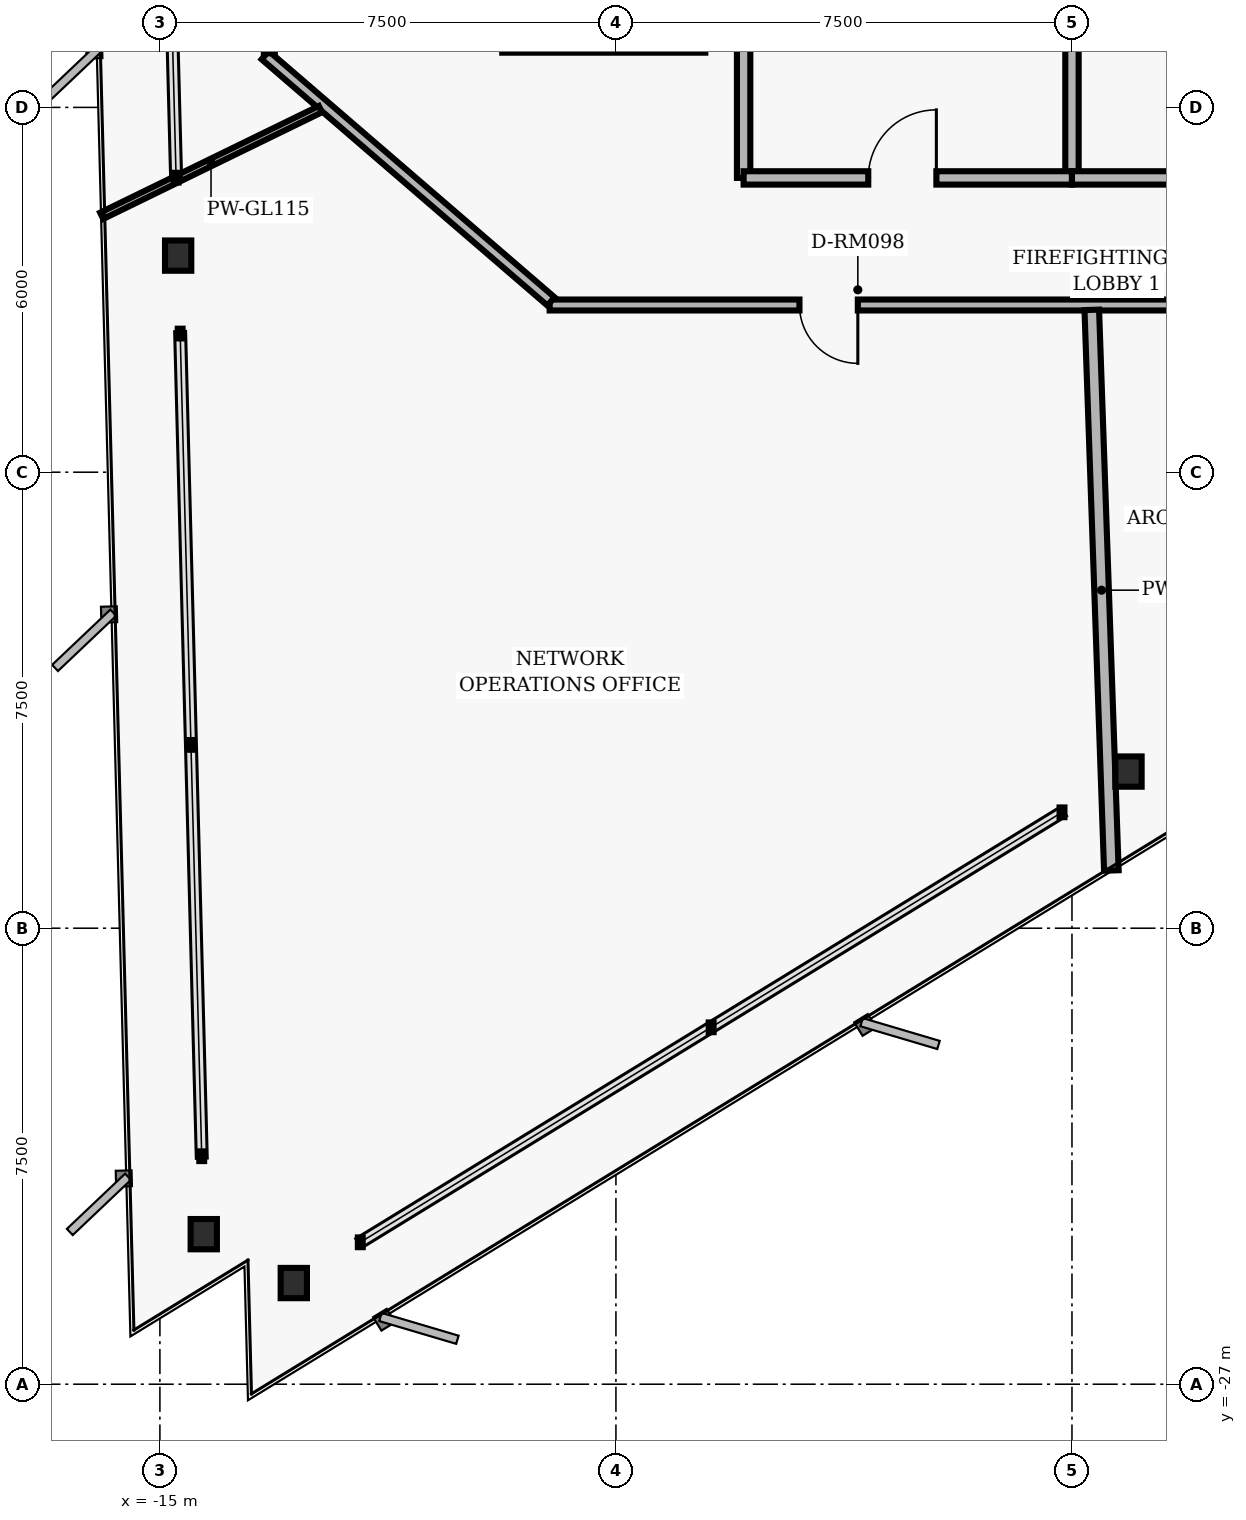
"""IFC4 building model, lengths in metres.
Left out: names, types, materials, properties, quantities, classifications, styles, units other than length and angle.
Written with IfcOpenShell. Run it as: python <this file> out.ifc"""

import sys

from ifc_helpers import new_model, si_unit, direction, frame, frame_2d, origin, origin_2d, place, context, subcontext, project, spatial, rectangle, i_section, extrude, element, fill, save


model = new_model("IFC4")
c1 = context("Model", 3, precision=1e-05, world=origin(), true_north=direction((0.0, 1.0)))
c2 = subcontext(c1, "Body", "Model", "MODEL_VIEW")
j1 = project(units=[si_unit("LENGTHUNIT", "METRE"), si_unit("PLANEANGLEUNIT", "RADIAN")], contexts=[c1])
p1 = place(None, origin())
s1 = spatial("IfcSite", under=j1, at=p1, CompositionType="ELEMENT")
p2 = place(p1, origin())
s2 = spatial("IfcBuilding", under=s1, at=p2, CompositionType="ELEMENT")
p3 = place(p2, frame((0.0, 0.0, 22.24)))
s3 = spatial("IfcBuildingStorey", under=s2, at=p3, CompositionType="ELEMENT", Elevation=22.24)
for number, where, z_axis, x_axis in (
    (1, (-14.7, -8.438, 0.0), (0.0, 0.0, 1.0), (1.0, 0.0, 0.0)),
    (2, (-14.279, -24.532, 0.0), (0.0, 0.0, 1.0), (1.0, 0.0, 0.0)),
    (3, (-12.798, -25.336, 0.0), (0.0, 0.0, 1.0), (1.0, 0.0, 0.0)),
    (4, (0.93, -16.924, 0.0), (0.0, 0.0, 1.0), (1.0, 0.0, 0.0)),
):
    element("IfcColumn", number, at=place(p3, frame(where, z_axis=z_axis, x_axis=x_axis)), inside=s3, PredefinedType="COLUMN", context=c2, shape_type="SweptSolid", body=[
        extrude(i_section(OverallWidth=0.432, OverallDepth=0.498, WebThickness=0.056, FlangeThickness=0.089, FilletRadius=0.025, at=origin_2d()), origin(), (0.0, 0.0, 1.0), 3.36),
    ])
p4 = place(p3, frame((-5.4, -7.16, 0.0), z_axis=(0.0, 0.0, 1.0), x_axis=(0.0, 1.0, 0.0)))
e5 = element("IfcWall", 5, at=p4, inside=s3, PredefinedType="PARTITIONING", context=c2, shape_type="SweptSolid", body=[
    extrude(rectangle(XDim=2.71, YDim=0.22, at=frame_2d((1.355, 0.0))), origin(), (0.0, 0.0, 1.0), 3.073),
])
p5 = place(p3, frame((0.0, -7.16, 0.0), z_axis=(0.0, 0.0, 1.0), x_axis=(0.0, 1.0, 0.0)))
e6 = element("IfcWall", 6, at=p5, inside=s3, PredefinedType="PARTITIONING", context=c2, shape_type="SweptSolid", body=[
    extrude(rectangle(XDim=2.81, YDim=0.22, at=frame_2d((1.405, 0.0))), origin(), (0.0, 0.0, 1.0), 3.073),
])
p6 = place(p3, frame((-5.4, -7.16, 0.0), z_axis=(0.0, 0.0, 1.0), x_axis=(1.0, 0.0, 0.0)))
e7 = element("IfcWall", 7, at=p6, inside=s3, PredefinedType="PARTITIONING", context=c2, shape_type="SweptSolid", body=[
    extrude(rectangle(XDim=5.4, YDim=0.22, at=frame_2d((2.7, 0.0))), origin(), (0.0, 0.0, 1.0), 3.073),
])
p7 = place(p6, frame((2.05, 0.0, 0.0)))
e8 = element("IfcOpeningElement", 8, at=p7, cuts=e7, PredefinedType="OPENING", context=c2, shape_type="SweptSolid", body=[
    extrude(rectangle(XDim=1.12, YDim=2.02, at=frame_2d((0.56, 1.01))), frame((0.0, 0.12, 0.0), z_axis=(0.0, -1.0, 0.0), x_axis=(1.0, 0.0, 0.0)), (0.0, 0.0, 1.0), 0.24),
])
p8 = place(p3, frame((0.0, -7.16, 0.0), z_axis=(0.0, 0.0, 1.0), x_axis=(1.0, 0.0, 0.0)))
e9 = element("IfcWall", 9, at=p8, inside=s3, PredefinedType="PARTITIONING", context=c2, shape_type="SweptSolid", body=[
    extrude(rectangle(XDim=5.4, YDim=0.22, at=frame_2d((2.7, 0.0))), origin(), (0.0, 0.0, 1.0), 3.073),
])
p9 = place(p8, frame((2.05, 0.0, 0.0)))
e10 = element("IfcOpeningElement", 10, at=p9, cuts=e9, PredefinedType="OPENING", context=c2, shape_type="SweptSolid", body=[
    extrude(rectangle(XDim=1.12, YDim=2.02, at=frame_2d((0.56, 1.01))), frame((0.0, 0.12, 0.0), z_axis=(0.0, -1.0, 0.0), x_axis=(1.0, 0.0, 0.0)), (0.0, 0.0, 1.0), 0.24),
])
p10 = place(p3, frame((8.41, -9.25, 0.0), z_axis=(0.0, 0.0, 1.0), x_axis=(-1.0, 0.0, 0.0)))
e11 = element("IfcWall", 11, at=p10, inside=s3, PredefinedType="PARTITIONING", context=c2, shape_type="SweptSolid", body=[
    extrude(rectangle(XDim=17.0, YDim=0.18, at=frame_2d((8.5, 0.0))), origin(), (0.0, 0.0, 1.0), 2.587),
])
p11 = place(p10, frame((11.932, 0.0, 0.0)))
e12 = element("IfcOpeningElement", 12, at=p11, cuts=e11, PredefinedType="OPENING", context=c2, shape_type="SweptSolid", body=[
    extrude(rectangle(XDim=0.96, YDim=2.02, at=frame_2d((0.48, 1.01))), frame((0.0, 0.1, 0.0), z_axis=(0.0, -1.0, 0.0), x_axis=(1.0, 0.0, 0.0)), (0.0, 0.0, 1.0), 0.2),
])
p12 = place(p10, frame((3.692, 0.0, 0.0)))
e13 = element("IfcOpeningElement", 13, at=p12, cuts=e11, PredefinedType="OPENING", context=c2, shape_type="SweptSolid", body=[
    extrude(rectangle(XDim=0.96, YDim=2.02, at=frame_2d((0.48, 1.01))), frame((0.0, 0.1, 0.0), z_axis=(0.0, -1.0, 0.0), x_axis=(1.0, 0.0, 0.0)), (0.0, 0.0, 1.0), 0.2),
])
p13 = place(p3, frame((-8.568, -9.191, 0.0), z_axis=(0.0, 0.0, 1.0), x_axis=(-0.757556899173, 0.652769135694, 0.0)))
e14 = element("IfcWall", 14, at=p13, inside=s3, PredefinedType="PARTITIONING", context=c2, shape_type="SweptSolid", body=[
    extrude(rectangle(XDim=6.204, YDim=0.18, at=frame_2d((3.102, 0.0))), origin(), (0.0, 0.0, 1.0), 3.073),
])
p14 = place(p3, frame((-13.2, -5.11, 0.0), z_axis=(0.0, 0.0, 1.0), x_axis=(0.0, 1.0, 0.0)))
e15 = element("IfcWall", 15, at=p14, inside=s3, PredefinedType="PARTITIONING", context=c2, shape_type="SweptSolid", body=[
    extrude(rectangle(XDim=10.22, YDim=0.18, at=frame_2d((5.11, 0.0))), origin(), (0.0, 0.0, 1.0), 2.587),
])
p15 = place(p14, frame((4.361, 0.0, 0.0)))
e16 = element("IfcOpeningElement", 16, at=p15, cuts=e15, PredefinedType="OPENING", context=c2, shape_type="SweptSolid", body=[
    extrude(rectangle(XDim=0.96, YDim=2.02, at=frame_2d((0.48, 1.01))), frame((0.0, 0.1, 0.0), z_axis=(0.0, -1.0, 0.0), x_axis=(1.0, 0.0, 0.0)), (0.0, 0.0, 1.0), 0.2),
])
p16 = place(p3, frame((-9.37, -5.01, 0.0), z_axis=(0.0, 0.0, 1.0), x_axis=(1.0, 0.0, 0.0)))
e17 = element("IfcWall", 17, at=p16, inside=s3, PredefinedType="PARTITIONING", context=c2, shape_type="SweptSolid", body=[
    extrude(rectangle(XDim=3.34, YDim=0.18, at=frame_2d((1.67, 0.0))), origin(), (0.0, 0.0, 1.0), 3.073),
])
p17 = place(p3, frame((-12.361, -6.029, 0.0), z_axis=(0.0, 0.0, 1.0), x_axis=(-0.898800692661, -0.438357519466, 0.0)))
e18 = element("IfcWall", 18, at=p17, inside=s3, PredefinedType="MOVABLE", context=c2, shape_type="SweptSolid", body=[
    extrude(rectangle(XDim=4.002, YDim=0.115, at=frame_2d((2.001, 0.0))), origin(), (0.0, 0.0, 1.0), 3.073),
])
p18 = place(p3, frame((0.326, -9.33, 0.0), z_axis=(0.0, 0.0, 1.0), x_axis=(0.034901543767, -0.999390755532, 0.0)))
e19 = element("IfcWall", 19, at=p18, inside=s3, PredefinedType="PARTITIONING", context=c2, shape_type="SweptSolid", body=[
    extrude(rectangle(XDim=9.227, YDim=0.24, at=frame_2d((4.613, 0.0))), origin(), (0.0, 0.0, 1.0), 3.073),
])
p19 = place(p7, origin())
e20 = element("IfcDoor", 20, at=p19, inside=s3, OperationType="SINGLE_SWING_RIGHT", PredefinedType="DOOR", context=c2, shape_type="SweptSolid", body=[
    extrude(rectangle(XDim=1.12, YDim=2.02, at=frame_2d((0.56, 1.01))), frame((0.0, 0.025, 0.0), z_axis=(0.0, -1.0, 0.0), x_axis=(1.0, 0.0, 0.0)), (0.0, 0.0, 1.0), 0.05),
])
fill(e8, e20)
p20 = place(p11, origin())
e21 = element("IfcDoor", 21, at=p20, inside=s3, OperationType="SINGLE_SWING_LEFT", PredefinedType="DOOR", context=c2, shape_type="SweptSolid", body=[
    extrude(rectangle(XDim=0.96, YDim=2.02, at=frame_2d((0.48, 1.01))), frame((0.0, 0.025, 0.0), z_axis=(0.0, -1.0, 0.0), x_axis=(1.0, 0.0, 0.0)), (0.0, 0.0, 1.0), 0.05),
])
fill(e12, e21)
save(model, sys.argv[1])
